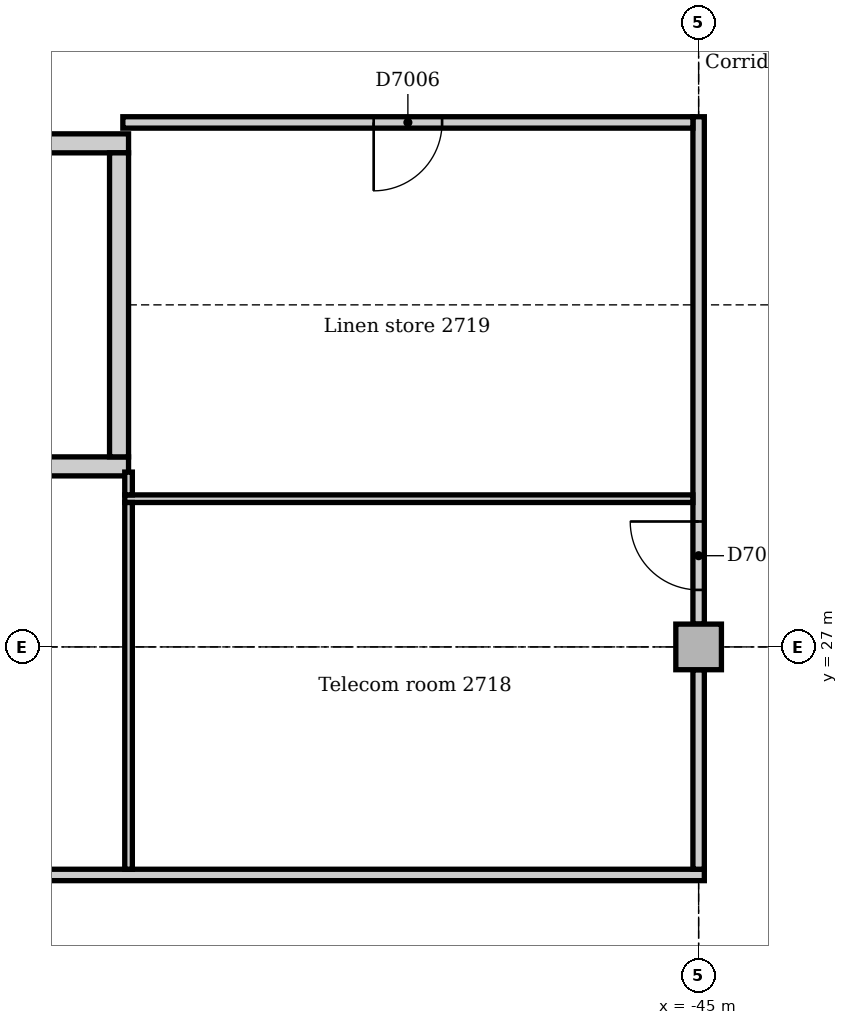
"""IFC4 building model, lengths in metres.
Left out: names, types, materials, properties, quantities, classifications, styles, units other than length and angle.
Written with IfcOpenShell. Run it as: python <this file> out.ifc"""

import sys

from ifc_helpers import new_model, si_unit, direction, frame, frame_2d, origin, origin_2d, place, context, subcontext, project, spatial, rectangle, extrude, element, fill, save


model = new_model("IFC4")
c1 = context("Model", 3, precision=1e-05, world=origin(), true_north=direction((0.0, 1.0)))
c2 = subcontext(c1, "Body", "Model", "MODEL_VIEW")
j1 = project(units=[si_unit("LENGTHUNIT", "METRE"), si_unit("PLANEANGLEUNIT", "RADIAN")], contexts=[c1])
p1 = place(None, origin())
s1 = spatial("IfcSite", under=j1, at=p1, CompositionType="ELEMENT")
p2 = place(p1, origin())
s2 = spatial("IfcBuilding", under=s1, at=p2, CompositionType="ELEMENT")
p3 = place(p2, frame((0.0, 0.0, 116.0)))
s3 = spatial("IfcBuildingStorey", under=s2, at=p3, CompositionType="ELEMENT", Elevation=116.0)
p4 = place(p3, frame((-60.0, 29.375, 0.0), z_axis=(0.0, 0.0, 1.0), x_axis=(1.0, 0.0, 0.0)))
e1 = element("IfcWall", 1, at=p4, inside=s3, PredefinedType="SOLIDWALL", context=c2, shape_type="SweptSolid", body=[
    extrude(rectangle(XDim=7.5, YDim=0.25, at=frame_2d((3.75, 0.0))), origin(), (0.0, 0.0, 1.0), 4.0),
])
p5 = place(p3, frame((-52.5, 33.625, 0.0), z_axis=(0.0, 0.0, 1.0), x_axis=(-1.0, 0.0, 0.0)))
e2 = element("IfcWall", 2, at=p5, inside=s3, PredefinedType="SOLIDWALL", context=c2, shape_type="SweptSolid", body=[
    extrude(rectangle(XDim=7.5, YDim=0.25, at=frame_2d((3.75, 0.0))), origin(), (0.0, 0.0, 1.0), 4.0),
])
p6 = place(p5, frame((6.0, 0.0, 0.0)))
e3 = element("IfcOpeningElement", 3, at=p6, cuts=e2, PredefinedType="OPENING", context=c2, shape_type="SweptSolid", body=[
    extrude(rectangle(XDim=1.0, YDim=2.1, at=frame_2d((0.5, 1.05))), frame((0.0, 0.135, 0.0), z_axis=(0.0, -1.0, 0.0), x_axis=(1.0, 0.0, 0.0)), (0.0, 0.0, 1.0), 0.27),
])
p7 = place(p3, frame((-52.625, 29.5, 0.0), z_axis=(0.0, 0.0, 1.0), x_axis=(0.0, 1.0, 0.0)))
e4 = element("IfcWall", 4, at=p7, inside=s3, PredefinedType="SOLIDWALL", context=c2, shape_type="SweptSolid", body=[
    extrude(rectangle(XDim=4.0, YDim=0.25, at=frame_2d((2.0, 0.0))), origin(), (0.0, 0.0, 1.0), 4.0),
])
p8 = place(p3, frame((-45.0, 27.0, 0.0), z_axis=(0.0, 0.0, 1.0), x_axis=(1.0, 0.0, 0.0)))
e5 = element("IfcColumn", 5, at=p8, inside=s3, PredefinedType="COLUMN", context=c2, shape_type="SweptSolid", body=[
    extrude(rectangle(XDim=0.6, YDim=0.6, at=origin_2d()), origin(), (0.0, 0.0, 1.0), 3.85),
])
p9 = place(p3, frame((-60.075, 24.0, 0.0), z_axis=(0.0, 0.0, 1.0), x_axis=(1.0, 0.0, 0.0)))
e6 = element("IfcWall", 6, at=p9, inside=s3, PredefinedType="PARTITIONING", context=c2, shape_type="SweptSolid", body=[
    extrude(rectangle(XDim=15.15, YDim=0.15, at=frame_2d((7.575, 0.0))), origin(), (0.0, 0.0, 1.0), 3.85),
])
p10 = place(p9, frame((3.4, 0.0, 0.0)))
e7 = element("IfcOpeningElement", 7, at=p10, cuts=e6, PredefinedType="OPENING", context=c2, shape_type="SweptSolid", body=[
    extrude(rectangle(XDim=0.9, YDim=2.1, at=frame_2d((0.45, 1.05))), frame((0.0, 0.085, 0.0), z_axis=(0.0, -1.0, 0.0), x_axis=(1.0, 0.0, 0.0)), (0.0, 0.0, 1.0), 0.17),
])
p11 = place(p3, frame((-45.0, 24.075, 0.0), z_axis=(0.0, 0.0, 1.0), x_axis=(0.0, 1.0, 0.0)))
e8 = element("IfcWall", 8, at=p11, inside=s3, PredefinedType="PARTITIONING", context=c2, shape_type="SweptSolid", body=[
    extrude(rectangle(XDim=2.625, YDim=0.15, at=frame_2d((1.312, 0.0))), origin(), (0.0, 0.0, 1.0), 3.362),
])
p12 = place(p3, frame((-45.0, 27.3, 0.0), z_axis=(0.0, 0.0, 1.0), x_axis=(0.0, 1.0, 0.0)))
e9 = element("IfcWall", 9, at=p12, inside=s3, PredefinedType="PARTITIONING", context=c2, shape_type="SweptSolid", body=[
    extrude(rectangle(XDim=6.675, YDim=0.15, at=frame_2d((3.337, 0.0))), origin(), (0.0, 0.0, 1.0), 3.362),
])
p13 = place(p12, frame((0.45, 0.0, 0.0)))
e10 = element("IfcOpeningElement", 10, at=p13, cuts=e9, PredefinedType="OPENING", context=c2, shape_type="SweptSolid", body=[
    extrude(rectangle(XDim=0.9, YDim=2.1, at=frame_2d((0.45, 1.05))), frame((0.0, 0.085, 0.0), z_axis=(0.0, -1.0, 0.0), x_axis=(1.0, 0.0, 0.0)), (0.0, 0.0, 1.0), 0.17),
])
p14 = place(p3, frame((-52.575, 33.9, 0.0), z_axis=(0.0, 0.0, 1.0), x_axis=(1.0, 0.0, 0.0)))
e11 = element("IfcWall", 11, at=p14, inside=s3, PredefinedType="PARTITIONING", context=c2, shape_type="SweptSolid", body=[
    extrude(rectangle(XDim=7.5, YDim=0.15, at=frame_2d((3.75, 0.0))), origin(), (0.0, 0.0, 1.0), 3.85),
])
p15 = place(p14, frame((3.3, 0.0, 0.0)))
e12 = element("IfcOpeningElement", 12, at=p15, cuts=e11, PredefinedType="OPENING", context=c2, shape_type="SweptSolid", body=[
    extrude(rectangle(XDim=0.9, YDim=2.1, at=frame_2d((0.45, 1.05))), frame((0.0, 0.085, 0.0), z_axis=(0.0, -1.0, 0.0), x_axis=(1.0, 0.0, 0.0)), (0.0, 0.0, 1.0), 0.17),
])
p16 = place(p3, frame((-52.55, 28.95, 0.0), z_axis=(0.0, 0.0, 1.0), x_axis=(1.0, 0.0, 0.0)))
e13 = element("IfcWall", 13, at=p16, inside=s3, PredefinedType="PARTITIONING", context=c2, shape_type="SweptSolid", body=[
    extrude(rectangle(XDim=7.475, YDim=0.1, at=frame_2d((3.737, 0.0))), origin(), (0.0, 0.0, 1.0), 3.85),
])
p17 = place(p3, frame((-52.5, 29.0, 0.0), z_axis=(0.0, 0.0, 1.0), x_axis=(0.0, 1.0, 0.0)))
e14 = element("IfcWall", 14, at=p17, inside=s3, PredefinedType="PARTITIONING", context=c2, shape_type="SweptSolid", body=[
    extrude(rectangle(XDim=0.3, YDim=0.1, at=frame_2d((0.15, 0.0))), origin(), (0.0, 0.0, 1.0), 3.85),
])
p18 = place(p3, frame((-52.5, 24.075, 0.0), z_axis=(0.0, 0.0, 1.0), x_axis=(0.0, 1.0, 0.0)))
e15 = element("IfcWall", 15, at=p18, inside=s3, PredefinedType="PARTITIONING", context=c2, shape_type="SweptSolid", body=[
    extrude(rectangle(XDim=4.825, YDim=0.1, at=frame_2d((2.413, 0.0))), origin(), (0.0, 0.0, 1.0), 3.85),
])
p19 = place(p13, origin())
e16 = element("IfcDoor", 16, at=p19, inside=s3, OperationType="SINGLE_SWING_RIGHT", PredefinedType="DOOR", context=c2, shape_type="SweptSolid", body=[
    extrude(rectangle(XDim=0.9, YDim=2.1, at=frame_2d((0.45, 1.05))), frame((0.0, 0.025, 0.0), z_axis=(0.0, -1.0, 0.0), x_axis=(1.0, 0.0, 0.0)), (0.0, 0.0, 1.0), 0.05),
])
fill(e10, e16)
p20 = place(p15, frame((0.9, 0.0, 0.0), z_axis=(0.0, 0.0, 1.0), x_axis=(-1.0, 0.0, 0.0)))
e17 = element("IfcDoor", 17, at=p20, inside=s3, OperationType="SINGLE_SWING_RIGHT", PredefinedType="DOOR", context=c2, shape_type="SweptSolid", body=[
    extrude(rectangle(XDim=0.9, YDim=2.1, at=frame_2d((0.45, 1.05))), frame((0.0, 0.025, 0.0), z_axis=(0.0, -1.0, 0.0), x_axis=(1.0, 0.0, 0.0)), (0.0, 0.0, 1.0), 0.05),
])
fill(e12, e17)
save(model, sys.argv[1])
